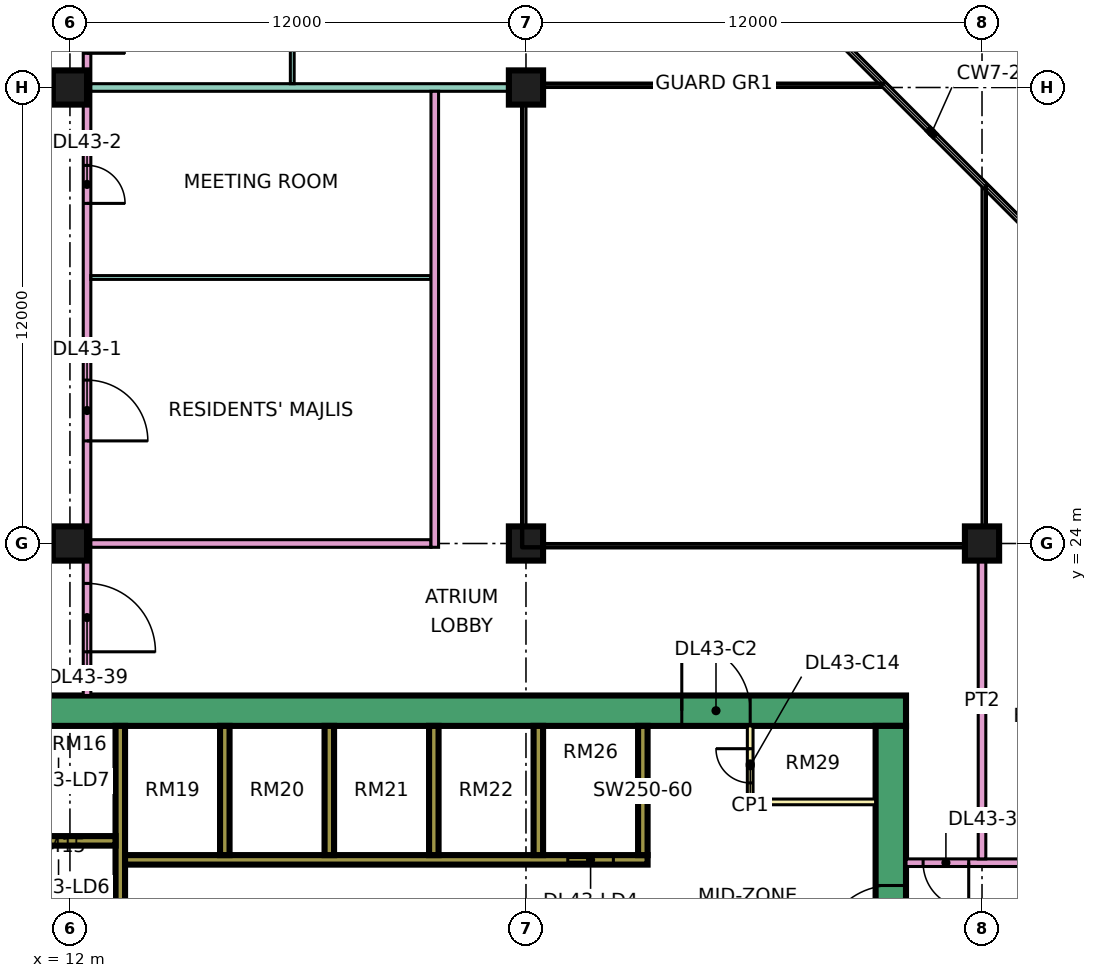
"""IFC4 building model, lengths in metres.
Left out: names, types, materials, properties, quantities, classifications, styles, units other than length and angle.
Written with IfcOpenShell. Run it as: python <this file> out.ifc"""

import sys

from ifc_helpers import new_model, si_unit, direction, frame, frame_2d, origin, origin_2d, place, context, subcontext, project, spatial, rectangle, extrude, element, fill, save


model = new_model("IFC4")
c1 = context("Model", 3, precision=1e-05, world=origin(), true_north=direction((0.0, 1.0)))
c2 = subcontext(c1, "Body", "Model", "MODEL_VIEW")
j1 = project(units=[si_unit("LENGTHUNIT", "METRE"), si_unit("PLANEANGLEUNIT", "RADIAN")], contexts=[c1])
p1 = place(None, origin())
s1 = spatial("IfcSite", under=j1, at=p1, CompositionType="ELEMENT")
p2 = place(p1, origin())
s2 = spatial("IfcBuilding", under=s1, at=p2, CompositionType="ELEMENT")
p3 = place(p2, frame((0.0, 0.0, 187.4)))
s3 = spatial("IfcBuildingStorey", under=s2, at=p3, CompositionType="ELEMENT", Elevation=187.4)
for number, where, z_axis, x_axis in (
    (1, (12.0, 24.0, 0.0), (0.0, 0.0, 1.0), (1.0, 0.0, 0.0)),
    (2, (12.0, 36.0, 0.0), (0.0, 0.0, 1.0), (1.0, 0.0, 0.0)),
    (3, (24.0, 24.0, 0.0), (0.0, 0.0, 1.0), (1.0, 0.0, 0.0)),
    (4, (24.0, 36.0, 0.0), (0.0, 0.0, 1.0), (1.0, 0.0, 0.0)),
    (5, (36.0, 24.0, 0.0), (0.0, 0.0, 1.0), (1.0, 0.0, 0.0)),
):
    element("IfcColumn", number, at=place(p3, frame(where, z_axis=z_axis, x_axis=x_axis)), inside=s3, PredefinedType="COLUMN", context=c2, shape_type="SweptSolid", body=[
        extrude(rectangle(XDim=0.9, YDim=0.9, at=origin_2d()), origin(), (0.0, 0.0, 1.0), 3.75),
    ])
p4 = place(p3, frame((9.0, 19.6, 0.0), z_axis=(0.0, 0.0, 1.0), x_axis=(1.0, 0.0, 0.0)))
e6 = element("IfcWall", 6, at=p4, inside=s3, PredefinedType="SHEAR", context=c2, shape_type="SweptSolid", body=[
    extrude(rectangle(XDim=25.0, YDim=0.8, at=frame_2d((12.5, 0.0))), origin(), (0.0, 0.0, 1.0), 3.75),
])
p5 = place(p4, frame((19.1, 0.0, 0.0)))
e7 = element("IfcOpeningElement", 7, at=p5, cuts=e6, PredefinedType="OPENING", context=c2, shape_type="SweptSolid", body=[
    extrude(rectangle(XDim=1.8, YDim=2.4, at=frame_2d((0.9, 1.2))), frame((0.0, 0.41, 0.0), z_axis=(0.0, -1.0, 0.0), x_axis=(1.0, 0.0, 0.0)), (0.0, 0.0, 1.0), 0.82),
])
p6 = place(p3, frame((33.6, 7.8, 0.0), z_axis=(0.0, 0.0, 1.0), x_axis=(0.0, 1.0, 0.0)))
e8 = element("IfcWall", 8, at=p6, inside=s3, PredefinedType="SHEAR", context=c2, shape_type="SweptSolid", body=[
    extrude(rectangle(XDim=11.4, YDim=0.8, at=frame_2d((5.7, 0.0))), origin(), (0.0, 0.0, 1.0), 3.75),
])
p7 = place(p6, frame((5.4, 0.0, 0.0)))
e9 = element("IfcOpeningElement", 9, at=p7, cuts=e8, PredefinedType="OPENING", context=c2, shape_type="SweptSolid", body=[
    extrude(rectangle(XDim=1.8, YDim=2.4, at=frame_2d((0.9, 1.2))), frame((0.0, 0.41, 0.0), z_axis=(0.0, -1.0, 0.0), x_axis=(1.0, 0.0, 0.0)), (0.0, 0.0, 1.0), 0.82),
])
p8 = place(p3, frame((13.325, 7.8, 0.0), z_axis=(0.0, 0.0, 1.0), x_axis=(0.0, 1.0, 0.0)))
e10 = element("IfcWall", 10, at=p8, inside=s3, PredefinedType="SHEAR", context=c2, shape_type="SweptSolid", body=[
    extrude(rectangle(XDim=11.4, YDim=0.25, at=frame_2d((5.7, 0.0))), origin(), (0.0, 0.0, 1.0), 3.75),
])
p9 = place(p3, frame((13.45, 15.675, 0.0), z_axis=(0.0, 0.0, 1.0), x_axis=(1.0, 0.0, 0.0)))
e11 = element("IfcWall", 11, at=p9, inside=s3, PredefinedType="SHEAR", context=c2, shape_type="SweptSolid", body=[
    extrude(rectangle(XDim=13.75, YDim=0.25, at=frame_2d((6.875, 0.0))), origin(), (0.0, 0.0, 1.0), 3.75),
])
p10 = place(p9, frame((11.65, 0.0, 0.0)))
e12 = element("IfcOpeningElement", 12, at=p10, cuts=e11, PredefinedType="OPENING", context=c2, shape_type="SweptSolid", body=[
    extrude(rectangle(XDim=1.2, YDim=2.2, at=frame_2d((0.6, 1.1))), frame((0.0, 0.135, 0.0), z_axis=(0.0, -1.0, 0.0), x_axis=(1.0, 0.0, 0.0)), (0.0, 0.0, 1.0), 0.27),
])
p11 = place(p3, frame((10.2, 16.175, 0.0), z_axis=(0.0, 0.0, 1.0), x_axis=(1.0, 0.0, 0.0)))
e13 = element("IfcWall", 13, at=p11, inside=s3, PredefinedType="SHEAR", context=c2, shape_type="SweptSolid", body=[
    extrude(rectangle(XDim=3.0, YDim=0.25, at=frame_2d((1.5, 0.0))), origin(), (0.0, 0.0, 1.0), 3.75),
])
for number, where, z_axis, x_axis in (
    (14, (16.075, 15.8, 0.0), (0.0, 0.0, 1.0), (0.0, 1.0, 0.0)),
    (15, (18.825, 15.8, 0.0), (0.0, 0.0, 1.0), (0.0, 1.0, 0.0)),
    (16, (21.575, 15.8, 0.0), (0.0, 0.0, 1.0), (0.0, 1.0, 0.0)),
    (17, (24.325, 15.8, 0.0), (0.0, 0.0, 1.0), (0.0, 1.0, 0.0)),
    (18, (27.075, 15.8, 0.0), (0.0, 0.0, 1.0), (0.0, 1.0, 0.0)),
):
    element("IfcWall", number, at=place(p3, frame(where, z_axis=z_axis, x_axis=x_axis)), inside=s3, PredefinedType="SHEAR", context=c2, shape_type="SweptSolid", body=[
        extrude(rectangle(XDim=3.4, YDim=0.25, at=frame_2d((1.7, 0.0))), origin(), (0.0, 0.0, 1.0), 3.75),
    ])
p12 = place(p3, frame((29.9, 17.2, 0.0), z_axis=(0.0, 0.0, 1.0), x_axis=(0.0, 1.0, 0.0)))
e19 = element("IfcWall", 19, at=p12, inside=s3, PredefinedType="PARTITIONING", context=c2, shape_type="SweptSolid", body=[
    extrude(rectangle(XDim=2.0, YDim=0.15, at=frame_2d((1.0, 0.0))), origin(), (0.0, 0.0, 1.0), 3.35),
])
p13 = place(p12, frame((0.5, 0.0, 0.0)))
e20 = element("IfcOpeningElement", 20, at=p13, cuts=e19, PredefinedType="OPENING", context=c2, shape_type="SweptSolid", body=[
    extrude(rectangle(XDim=0.9, YDim=2.1, at=frame_2d((0.45, 1.05))), frame((0.0, 0.085, 0.0), z_axis=(0.0, -1.0, 0.0), x_axis=(1.0, 0.0, 0.0)), (0.0, 0.0, 1.0), 0.17),
])
p14 = place(p3, frame((29.9, 17.2, 0.0), z_axis=(0.0, 0.0, 1.0), x_axis=(1.0, 0.0, 0.0)))
e21 = element("IfcWall", 21, at=p14, inside=s3, PredefinedType="PARTITIONING", context=c2, shape_type="SweptSolid", body=[
    extrude(rectangle(XDim=3.3, YDim=0.15, at=frame_2d((1.65, 0.0))), origin(), (0.0, 0.0, 1.0), 3.35),
])
p15 = place(p3, frame((12.45, 20.0, 0.0), z_axis=(0.0, 0.0, 1.0), x_axis=(0.0, 1.0, 0.0)))
e22 = element("IfcWall", 22, at=p15, inside=s3, PredefinedType="PARTITIONING", context=c2, shape_type="SweptSolid", body=[
    extrude(rectangle(XDim=43.0, YDim=0.2, at=frame_2d((21.5, 0.0))), origin(), (0.0, 0.0, 1.0), 3.35),
])
p16 = place(p15, frame((6.7, 0.0, 0.0)))
e23 = element("IfcOpeningElement", 23, at=p16, cuts=e22, PredefinedType="OPENING", context=c2, shape_type="SweptSolid", body=[
    extrude(rectangle(XDim=1.6, YDim=2.1, at=frame_2d((0.8, 1.05))), frame((0.0, 0.11, 0.0), z_axis=(0.0, -1.0, 0.0), x_axis=(1.0, 0.0, 0.0)), (0.0, 0.0, 1.0), 0.22),
])
p17 = place(p15, frame((12.95, 0.0, 0.0)))
e24 = element("IfcOpeningElement", 24, at=p17, cuts=e22, PredefinedType="OPENING", context=c2, shape_type="SweptSolid", body=[
    extrude(rectangle(XDim=1.0, YDim=2.1, at=frame_2d((0.5, 1.05))), frame((0.0, 0.11, 0.0), z_axis=(0.0, -1.0, 0.0), x_axis=(1.0, 0.0, 0.0)), (0.0, 0.0, 1.0), 0.22),
])
p18 = place(p15, frame((16.9, 0.0, 0.0)))
e25 = element("IfcOpeningElement", 25, at=p18, cuts=e22, PredefinedType="OPENING", context=c2, shape_type="SweptSolid", body=[
    extrude(rectangle(XDim=1.0, YDim=2.1, at=frame_2d((0.5, 1.05))), frame((0.0, 0.11, 0.0), z_axis=(0.0, -1.0, 0.0), x_axis=(1.0, 0.0, 0.0)), (0.0, 0.0, 1.0), 0.22),
])
p19 = place(p15, frame((40.75, 0.0, 0.0)))
e26 = element("IfcOpeningElement", 26, at=p19, cuts=e22, PredefinedType="OPENING", context=c2, shape_type="SweptSolid", body=[
    extrude(rectangle(XDim=1.0, YDim=2.1, at=frame_2d((0.5, 1.05))), frame((0.0, 0.11, 0.0), z_axis=(0.0, -1.0, 0.0), x_axis=(1.0, 0.0, 0.0)), (0.0, 0.0, 1.0), 0.22),
])
p20 = place(p15, frame((1.15, 0.0, 0.0)))
e27 = element("IfcOpeningElement", 27, at=p20, cuts=e22, PredefinedType="OPENING", context=c2, shape_type="SweptSolid", body=[
    extrude(rectangle(XDim=1.8, YDim=2.1, at=frame_2d((0.9, 1.05))), frame((0.0, 0.11, 0.0), z_axis=(0.0, -1.0, 0.0), x_axis=(1.0, 0.0, 0.0)), (0.0, 0.0, 1.0), 0.22),
])
p21 = place(p15, frame((28.6, 0.0, 0.0)))
e28 = element("IfcOpeningElement", 28, at=p21, cuts=e22, PredefinedType="OPENING", context=c2, shape_type="SweptSolid", body=[
    extrude(rectangle(XDim=1.8, YDim=2.1, at=frame_2d((0.9, 1.05))), frame((0.0, 0.11, 0.0), z_axis=(0.0, -1.0, 0.0), x_axis=(1.0, 0.0, 0.0)), (0.0, 0.0, 1.0), 0.22),
])
p22 = place(p3, frame((12.55, 24.0, 0.0), z_axis=(0.0, 0.0, 1.0), x_axis=(1.0, 0.0, 0.0)))
e29 = element("IfcWall", 29, at=p22, inside=s3, PredefinedType="PARTITIONING", context=c2, shape_type="SweptSolid", body=[
    extrude(rectangle(XDim=8.95, YDim=0.2, at=frame_2d((4.475, 0.0))), origin(), (0.0, 0.0, 1.0), 3.35),
])
p23 = place(p3, frame((12.55, 31.0, 0.0), z_axis=(0.0, 0.0, 1.0), x_axis=(1.0, 0.0, 0.0)))
e30 = element("IfcWall", 30, at=p23, inside=s3, PredefinedType="PARTITIONING", context=c2, shape_type="SweptSolid", body=[
    extrude(rectangle(XDim=8.95, YDim=0.1, at=frame_2d((4.475, 0.0))), origin(), (0.0, 0.0, 1.0), 3.35),
])
p24 = place(p3, frame((12.55, 36.0, 0.0), z_axis=(0.0, 0.0, 1.0), x_axis=(1.0, 0.0, 0.0)))
e31 = element("IfcWall", 31, at=p24, inside=s3, PredefinedType="PARTITIONING", context=c2, shape_type="SweptSolid", body=[
    extrude(rectangle(XDim=11.45, YDim=0.2, at=frame_2d((5.725, 0.0))), origin(), (0.0, 0.0, 1.0), 3.35),
])
p25 = place(p3, frame((17.85, 36.1, 0.0), z_axis=(0.0, 0.0, 1.0), x_axis=(0.0, 1.0, 0.0)))
e32 = element("IfcWall", 32, at=p25, inside=s3, PredefinedType="PARTITIONING", context=c2, shape_type="SweptSolid", body=[
    extrude(rectangle(XDim=2.85, YDim=0.1, at=frame_2d((1.425, 0.0))), origin(), (0.0, 0.0, 1.0), 3.35),
])
p26 = place(p25, frame((0.95, 0.0, 0.0)))
e33 = element("IfcOpeningElement", 33, at=p26, cuts=e32, PredefinedType="OPENING", context=c2, shape_type="SweptSolid", body=[
    extrude(rectangle(XDim=0.9, YDim=2.1, at=frame_2d((0.45, 1.05))), frame((0.0, 0.06, 0.0), z_axis=(0.0, -1.0, 0.0), x_axis=(1.0, 0.0, 0.0)), (0.0, 0.0, 1.0), 0.12),
])
p27 = place(p3, frame((21.6, 23.9, 0.0), z_axis=(0.0, 0.0, 1.0), x_axis=(0.0, 1.0, 0.0)))
e34 = element("IfcWall", 34, at=p27, inside=s3, PredefinedType="PARTITIONING", context=c2, shape_type="SweptSolid", body=[
    extrude(rectangle(XDim=12.0, YDim=0.2, at=frame_2d((6.0, 0.0))), origin(), (0.0, 0.0, 1.0), 3.35),
])
p28 = place(p3, frame((34.0, 15.6, 0.0), z_axis=(0.0, 0.0, 1.0), x_axis=(1.0, 0.0, 0.0)))
e35 = element("IfcWall", 35, at=p28, inside=s3, PredefinedType="PARTITIONING", context=c2, shape_type="SweptSolid", body=[
    extrude(rectangle(XDim=10.35, YDim=0.2, at=frame_2d((5.175, 0.0))), origin(), (0.0, 0.0, 1.0), 3.35),
])
p29 = place(p28, frame((5.6, 0.0, 0.0)))
e36 = element("IfcOpeningElement", 36, at=p29, cuts=e35, PredefinedType="OPENING", context=c2, shape_type="SweptSolid", body=[
    extrude(rectangle(XDim=1.0, YDim=2.1, at=frame_2d((0.5, 1.05))), frame((0.0, 0.11, 0.0), z_axis=(0.0, -1.0, 0.0), x_axis=(1.0, 0.0, 0.0)), (0.0, 0.0, 1.0), 0.22),
])
p30 = place(p28, frame((0.45, 0.0, 0.0)))
e37 = element("IfcOpeningElement", 37, at=p30, cuts=e35, PredefinedType="OPENING", context=c2, shape_type="SweptSolid", body=[
    extrude(rectangle(XDim=1.2, YDim=2.1, at=frame_2d((0.6, 1.05))), frame((0.0, 0.11, 0.0), z_axis=(0.0, -1.0, 0.0), x_axis=(1.0, 0.0, 0.0)), (0.0, 0.0, 1.0), 0.22),
])
p31 = place(p3, frame((36.0, 15.7, 0.0), z_axis=(0.0, 0.0, 1.0), x_axis=(0.0, 1.0, 0.0)))
e38 = element("IfcWall", 38, at=p31, inside=s3, PredefinedType="PARTITIONING", context=c2, shape_type="SweptSolid", body=[
    extrude(rectangle(XDim=8.3, YDim=0.2, at=frame_2d((4.15, 0.0))), origin(), (0.0, 0.0, 1.0), 3.35),
])
p32 = place(p10, origin())
e39 = element("IfcDoor", 39, at=p32, inside=s3, OperationType="DOUBLE_DOOR_SLIDING", PredefinedType="DOOR", context=c2, shape_type="SweptSolid", body=[
    extrude(rectangle(XDim=1.2, YDim=2.2, at=frame_2d((0.6, 1.1))), frame((0.0, 0.025, 0.0), z_axis=(0.0, -1.0, 0.0), x_axis=(1.0, 0.0, 0.0)), (0.0, 0.0, 1.0), 0.05),
])
fill(e12, e39)
p33 = place(p7, origin())
e40 = element("IfcDoor", 40, at=p33, inside=s3, OperationType="DOUBLE_DOOR_SINGLE_SWING", PredefinedType="DOOR", context=c2, shape_type="SweptSolid", body=[
    extrude(rectangle(XDim=1.8, YDim=2.4, at=frame_2d((0.9, 1.2))), frame((0.0, 0.025, 0.0), z_axis=(0.0, -1.0, 0.0), x_axis=(1.0, 0.0, 0.0)), (0.0, 0.0, 1.0), 0.05),
])
fill(e9, e40)
p34 = place(p5, origin())
e41 = element("IfcDoor", 41, at=p34, inside=s3, OperationType="DOUBLE_DOOR_SINGLE_SWING", PredefinedType="DOOR", context=c2, shape_type="SweptSolid", body=[
    extrude(rectangle(XDim=1.8, YDim=2.4, at=frame_2d((0.9, 1.2))), frame((0.0, 0.025, 0.0), z_axis=(0.0, -1.0, 0.0), x_axis=(1.0, 0.0, 0.0)), (0.0, 0.0, 1.0), 0.05),
])
fill(e7, e41)
p35 = place(p13, frame((0.9, 0.0, 0.0), z_axis=(0.0, 0.0, 1.0), x_axis=(-1.0, 0.0, 0.0)))
e42 = element("IfcDoor", 42, at=p35, inside=s3, OperationType="SINGLE_SWING_RIGHT", PredefinedType="DOOR", context=c2, shape_type="SweptSolid", body=[
    extrude(rectangle(XDim=0.9, YDim=2.1, at=frame_2d((0.45, 1.05))), frame((0.0, 0.025, 0.0), z_axis=(0.0, -1.0, 0.0), x_axis=(1.0, 0.0, 0.0)), (0.0, 0.0, 1.0), 0.05),
])
fill(e20, e42)
p36 = place(p16, frame((1.6, 0.0, 0.0), z_axis=(0.0, 0.0, 1.0), x_axis=(-1.0, 0.0, 0.0)))
e43 = element("IfcDoor", 43, at=p36, inside=s3, OperationType="DOUBLE_DOOR_SINGLE_SWING", PredefinedType="DOOR", context=c2, shape_type="SweptSolid", body=[
    extrude(rectangle(XDim=1.6, YDim=2.1, at=frame_2d((0.8, 1.05))), frame((0.0, 0.025, 0.0), z_axis=(0.0, -1.0, 0.0), x_axis=(1.0, 0.0, 0.0)), (0.0, 0.0, 1.0), 0.05),
])
fill(e23, e43)
p37 = place(p17, frame((1.0, 0.0, 0.0), z_axis=(0.0, 0.0, 1.0), x_axis=(-1.0, 0.0, 0.0)))
e44 = element("IfcDoor", 44, at=p37, inside=s3, OperationType="SINGLE_SWING_LEFT", PredefinedType="DOOR", context=c2, shape_type="SweptSolid", body=[
    extrude(rectangle(XDim=1.0, YDim=2.1, at=frame_2d((0.5, 1.05))), frame((0.0, 0.025, 0.0), z_axis=(0.0, -1.0, 0.0), x_axis=(1.0, 0.0, 0.0)), (0.0, 0.0, 1.0), 0.05),
])
fill(e24, e44)
p38 = place(p18, frame((1.0, 0.0, 0.0), z_axis=(0.0, 0.0, 1.0), x_axis=(-1.0, 0.0, 0.0)))
e45 = element("IfcDoor", 45, at=p38, inside=s3, OperationType="SINGLE_SWING_LEFT", PredefinedType="DOOR", context=c2, shape_type="SweptSolid", body=[
    extrude(rectangle(XDim=1.0, YDim=2.1, at=frame_2d((0.5, 1.05))), frame((0.0, 0.025, 0.0), z_axis=(0.0, -1.0, 0.0), x_axis=(1.0, 0.0, 0.0)), (0.0, 0.0, 1.0), 0.05),
])
fill(e25, e45)
p39 = place(p30, origin())
e46 = element("IfcDoor", 46, at=p39, inside=s3, OperationType="SINGLE_SWING_RIGHT", PredefinedType="DOOR", context=c2, shape_type="SweptSolid", body=[
    extrude(rectangle(XDim=1.2, YDim=2.1, at=frame_2d((0.6, 1.05))), frame((0.0, 0.025, 0.0), z_axis=(0.0, -1.0, 0.0), x_axis=(1.0, 0.0, 0.0)), (0.0, 0.0, 1.0), 0.05),
])
fill(e37, e46)
p40 = place(p20, frame((1.8, 0.0, 0.0), z_axis=(0.0, 0.0, 1.0), x_axis=(-1.0, 0.0, 0.0)))
e47 = element("IfcDoor", 47, at=p40, inside=s3, OperationType="DOUBLE_DOOR_SINGLE_SWING", PredefinedType="DOOR", context=c2, shape_type="SweptSolid", body=[
    extrude(rectangle(XDim=1.8, YDim=2.1, at=frame_2d((0.9, 1.05))), frame((0.0, 0.025, 0.0), z_axis=(0.0, -1.0, 0.0), x_axis=(1.0, 0.0, 0.0)), (0.0, 0.0, 1.0), 0.05),
])
fill(e27, e47)
save(model, sys.argv[1])
